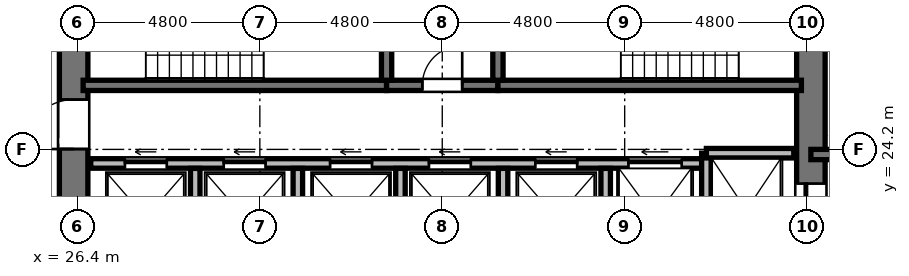
"""IFC4 building model, lengths in metres.
Left out: names, types, materials, properties, quantities, classifications, styles, units other than length and angle.
Written with IfcOpenShell. Run it as: python <this file> out.ifc"""

import sys

from ifc_helpers import new_model, si_unit, direction, frame, frame_2d, origin, place, context, subcontext, project, spatial, rectangle, extrude, element, fill, save


model = new_model("IFC4")
c1 = context("Model", 3, precision=1e-05, world=origin(), true_north=direction((0.0, 1.0)))
c2 = subcontext(c1, "Body", "Model", "MODEL_VIEW")
j1 = project(units=[si_unit("LENGTHUNIT", "METRE"), si_unit("PLANEANGLEUNIT", "RADIAN")], contexts=[c1])
p1 = place(None, origin())
s1 = spatial("IfcSite", under=j1, at=p1, CompositionType="ELEMENT")
p2 = place(p1, origin())
s2 = spatial("IfcBuilding", under=s1, at=p2, CompositionType="ELEMENT")
p3 = place(p2, frame((0.0, 0.0, 103.632)))
s3 = spatial("IfcBuildingStorey", under=s2, at=p3, CompositionType="ELEMENT", Elevation=103.632)
p4 = place(p3, frame((26.3, 20.95, 0.0), z_axis=(0.0, 0.0, 1.0), x_axis=(0.0, 1.0, 0.0)))
e1 = element("IfcWall", 1, at=p4, inside=s3, PredefinedType="SHEAR", context=c2, shape_type="SweptSolid", body=[
    extrude(rectangle(XDim=14.1, YDim=0.75, at=frame_2d((7.05, 0.0))), origin(), (0.0, 0.0, 1.0), 3.648),
])
p5 = place(p4, frame((6.5, 0.0, 0.0)))
e2 = element("IfcOpeningElement", 2, at=p5, cuts=e1, PredefinedType="OPENING", context=c2, shape_type="SweptSolid", body=[
    extrude(rectangle(XDim=1.2, YDim=2.15, at=frame_2d((0.6, 1.075))), frame((0.0, 0.385, 0.0), z_axis=(0.0, -1.0, 0.0), x_axis=(1.0, 0.0, 0.0)), (0.0, 0.0, 1.0), 0.77),
])
p6 = place(p4, frame((9.6, 0.0, 0.0)))
e3 = element("IfcOpeningElement", 3, at=p6, cuts=e1, PredefinedType="OPENING", context=c2, shape_type="SweptSolid", body=[
    extrude(rectangle(XDim=1.3, YDim=2.2, at=frame_2d((0.65, 1.1))), frame((0.0, 0.385, 0.0), z_axis=(0.0, -1.0, 0.0), x_axis=(1.0, 0.0, 0.0)), (0.0, 0.0, 1.0), 0.77),
])
p7 = place(p4, frame((3.26, 0.0, 0.0)))
e4 = element("IfcOpeningElement", 4, at=p7, cuts=e1, PredefinedType="OPENING", context=c2, shape_type="SweptSolid", body=[
    extrude(rectangle(XDim=1.3, YDim=2.2, at=frame_2d((0.65, 1.1))), frame((0.0, 0.385, 0.0), z_axis=(0.0, -1.0, 0.0), x_axis=(1.0, 0.0, 0.0)), (0.0, 0.0, 1.0), 0.77),
])
p8 = place(p3, frame((45.7, 20.95, 0.0), z_axis=(0.0, 0.0, 1.0), x_axis=(0.0, 1.0, 0.0)))
e5 = element("IfcWall", 5, at=p8, inside=s3, PredefinedType="SHEAR", context=c2, shape_type="SweptSolid", body=[
    extrude(rectangle(XDim=14.1, YDim=0.75, at=frame_2d((7.05, 0.0))), origin(), (0.0, 0.0, 1.0), 3.648),
])
p9 = place(p8, frame((11.75, 0.0, 0.0)))
e6 = element("IfcOpeningElement", 6, at=p9, cuts=e5, PredefinedType="OPENING", context=c2, shape_type="SweptSolid", body=[
    extrude(rectangle(XDim=1.4, YDim=2.3, at=frame_2d((0.7, 1.15))), frame((0.0, 0.385, 0.0), z_axis=(0.0, -1.0, 0.0), x_axis=(1.0, 0.0, 0.0)), (0.0, 0.0, 1.0), 0.77),
])
p10 = place(p8, frame((0.95, 0.0, 0.0)))
e7 = element("IfcOpeningElement", 7, at=p10, cuts=e5, PredefinedType="OPENING", context=c2, shape_type="SweptSolid", body=[
    extrude(rectangle(XDim=1.4, YDim=2.3, at=frame_2d((0.7, 1.15))), frame((0.0, 0.385, 0.0), z_axis=(0.0, -1.0, 0.0), x_axis=(1.0, 0.0, 0.0)), (0.0, 0.0, 1.0), 0.77),
])
p11 = place(p3, frame((26.55, 25.885, 0.0), z_axis=(0.0, 0.0, 1.0), x_axis=(1.0, 0.0, 0.0)))
e8 = element("IfcWall", 8, at=p11, inside=s3, PredefinedType="SHEAR", context=c2, shape_type="SweptSolid", body=[
    extrude(rectangle(XDim=7.985, YDim=0.27, at=frame_2d((3.992, 0.0))), origin(), (0.0, 0.0, 1.0), 3.648),
])
p12 = place(p3, frame((34.535, 25.885, 0.0), z_axis=(0.0, 0.0, 1.0), x_axis=(1.0, 0.0, 0.0)))
e9 = element("IfcWall", 9, at=p12, inside=s3, PredefinedType="SHEAR", context=c2, shape_type="SweptSolid", body=[
    extrude(rectangle(XDim=2.93, YDim=0.27, at=frame_2d((1.465, 0.0))), origin(), (0.0, 0.0, 1.0), 3.648),
])
p13 = place(p12, frame((0.94, 0.0, 0.0)))
e10 = element("IfcOpeningElement", 10, at=p13, cuts=e9, PredefinedType="OPENING", context=c2, shape_type="SweptSolid", body=[
    extrude(rectangle(XDim=1.05, YDim=2.15, at=frame_2d((0.525, 1.075))), frame((0.0, 0.145, 0.0), z_axis=(0.0, -1.0, 0.0), x_axis=(1.0, 0.0, 0.0)), (0.0, 0.0, 1.0), 0.29),
])
p14 = place(p3, frame((37.465, 25.885, 0.0), z_axis=(0.0, 0.0, 1.0), x_axis=(1.0, 0.0, 0.0)))
e11 = element("IfcWall", 11, at=p14, inside=s3, PredefinedType="SHEAR", context=c2, shape_type="SweptSolid", body=[
    extrude(rectangle(XDim=7.985, YDim=0.27, at=frame_2d((3.992, 0.0))), origin(), (0.0, 0.0, 1.0), 3.648),
])
for number, where, z_axis, x_axis in (
    (12, (34.535, 26.02, 0.0), (0.0, 0.0, 1.0), (0.0, 1.0, 0.0)),
    (13, (37.465, 26.02, 0.0), (0.0, 0.0, 1.0), (0.0, 1.0, 0.0)),
):
    element("IfcWall", number, at=place(p3, frame(where, z_axis=z_axis, x_axis=x_axis)), inside=s3, PredefinedType="SHEAR", context=c2, shape_type="SweptSolid", body=[
        extrude(rectangle(XDim=4.08, YDim=0.27, at=frame_2d((2.04, 0.0))), origin(), (0.0, 0.0, 1.0), 3.648),
    ])
p15 = place(p3, frame((26.75, 23.83, 0.0), z_axis=(0.0, 0.0, 1.0), x_axis=(1.0, 0.0, 0.0)))
e14 = element("IfcWall", 14, at=p15, inside=s3, PredefinedType="SOLIDWALL", context=c2, shape_type="SweptSolid", body=[
    extrude(rectangle(XDim=16.2, YDim=0.25, at=frame_2d((8.1, 0.0))), origin(), (0.0, 0.0, 1.0), 3.428),
])
p16 = place(p15, frame((0.9, 0.0, 0.0)))
e15 = element("IfcOpeningElement", 15, at=p16, cuts=e14, PredefinedType="OPENING", context=c2, shape_type="SweptSolid", body=[
    extrude(rectangle(XDim=1.1, YDim=2.2, at=frame_2d((0.55, 1.1))), frame((0.0, 0.135, 0.0), z_axis=(0.0, -1.0, 0.0), x_axis=(1.0, 0.0, 0.0)), (0.0, 0.0, 1.0), 0.27),
])
p17 = place(p15, frame((3.5, 0.0, 0.0)))
e16 = element("IfcOpeningElement", 16, at=p17, cuts=e14, PredefinedType="OPENING", context=c2, shape_type="SweptSolid", body=[
    extrude(rectangle(XDim=1.1, YDim=2.2, at=frame_2d((0.55, 1.1))), frame((0.0, 0.135, 0.0), z_axis=(0.0, -1.0, 0.0), x_axis=(1.0, 0.0, 0.0)), (0.0, 0.0, 1.0), 0.27),
])
p18 = place(p15, frame((6.3, 0.0, 0.0)))
e17 = element("IfcOpeningElement", 17, at=p18, cuts=e14, PredefinedType="OPENING", context=c2, shape_type="SweptSolid", body=[
    extrude(rectangle(XDim=1.1, YDim=2.2, at=frame_2d((0.55, 1.1))), frame((0.0, 0.135, 0.0), z_axis=(0.0, -1.0, 0.0), x_axis=(1.0, 0.0, 0.0)), (0.0, 0.0, 1.0), 0.27),
])
p19 = place(p15, frame((8.9, 0.0, 0.0)))
e18 = element("IfcOpeningElement", 18, at=p19, cuts=e14, PredefinedType="OPENING", context=c2, shape_type="SweptSolid", body=[
    extrude(rectangle(XDim=1.1, YDim=2.2, at=frame_2d((0.55, 1.1))), frame((0.0, 0.135, 0.0), z_axis=(0.0, -1.0, 0.0), x_axis=(1.0, 0.0, 0.0)), (0.0, 0.0, 1.0), 0.27),
])
p20 = place(p15, frame((11.7, 0.0, 0.0)))
e19 = element("IfcOpeningElement", 19, at=p20, cuts=e14, PredefinedType="OPENING", context=c2, shape_type="SweptSolid", body=[
    extrude(rectangle(XDim=1.1, YDim=2.2, at=frame_2d((0.55, 1.1))), frame((0.0, 0.135, 0.0), z_axis=(0.0, -1.0, 0.0), x_axis=(1.0, 0.0, 0.0)), (0.0, 0.0, 1.0), 0.27),
])
p21 = place(p15, frame((14.15, 0.0, 0.0)))
e20 = element("IfcOpeningElement", 20, at=p21, cuts=e14, PredefinedType="OPENING", context=c2, shape_type="SweptSolid", body=[
    extrude(rectangle(XDim=1.4, YDim=2.3, at=frame_2d((0.7, 1.15))), frame((0.0, 0.135, 0.0), z_axis=(0.0, -1.0, 0.0), x_axis=(1.0, 0.0, 0.0)), (0.0, 0.0, 1.0), 0.27),
])
p22 = place(p3, frame((42.95, 20.9, 0.0), z_axis=(0.0, 0.0, 1.0), x_axis=(0.0, 1.0, 0.0)))
e21 = element("IfcWall", 21, at=p22, inside=s3, PredefinedType="SOLIDWALL", context=c2, shape_type="SweptSolid", body=[
    extrude(rectangle(XDim=3.2, YDim=0.25, at=frame_2d((1.6, 0.0))), origin(), (0.0, 0.0, 1.0), 3.428),
])
p23 = place(p3, frame((42.95, 24.1, 0.0), z_axis=(0.0, 0.0, 1.0), x_axis=(1.0, 0.0, 0.0)))
e22 = element("IfcWall", 22, at=p23, inside=s3, PredefinedType="SOLIDWALL", context=c2, shape_type="SweptSolid", body=[
    extrude(rectangle(XDim=2.3, YDim=0.25, at=frame_2d((1.15, 0.0))), origin(), (0.0, 0.0, 1.0), 3.428),
])
for number, where, z_axis, x_axis in (
    (23, (29.5, 20.9, 0.0), (0.0, 0.0, 1.0), (0.0, 1.0, 0.0)),
    (24, (32.2, 20.9, 0.0), (0.0, 0.0, 1.0), (0.0, 1.0, 0.0)),
    (25, (34.9, 20.9, 0.0), (0.0, 0.0, 1.0), (0.0, 1.0, 0.0)),
    (26, (37.6, 20.9, 0.0), (0.0, 0.0, 1.0), (0.0, 1.0, 0.0)),
    (27, (40.3, 20.9, 0.0), (0.0, 0.0, 1.0), (0.0, 1.0, 0.0)),
):
    element("IfcWall", number, at=place(p3, frame(where, z_axis=z_axis, x_axis=x_axis)), inside=s3, PredefinedType="SOLIDWALL", context=c2, shape_type="SweptSolid", body=[
        extrude(rectangle(XDim=2.8, YDim=0.25, at=frame_2d((1.4, 0.0))), origin(), (0.0, 0.0, 1.0), 3.428),
    ])
p24 = place(p3, frame((45.7, 24.065, 0.0), z_axis=(0.0, 0.0, 1.0), x_axis=(1.0, 0.0, 0.0)))
e28 = element("IfcWall", 28, at=p24, inside=s3, PredefinedType="SHEAR", context=c2, shape_type="SweptSolid", body=[
    extrude(rectangle(XDim=4.715, YDim=0.27, at=frame_2d((2.357, 0.0))), origin(), (0.0, 0.0, 1.0), 3.648),
])
p25 = place(p13, origin())
e29 = element("IfcDoor", 29, at=p25, inside=s3, OperationType="SINGLE_SWING_RIGHT", PredefinedType="DOOR", context=c2, shape_type="SweptSolid", body=[
    extrude(rectangle(XDim=1.05, YDim=2.15, at=frame_2d((0.525, 1.075))), frame((0.0, 0.025, 0.0), z_axis=(0.0, -1.0, 0.0), x_axis=(1.0, 0.0, 0.0)), (0.0, 0.0, 1.0), 0.05),
])
fill(e10, e29)
p26 = place(p7, origin())
e30 = element("IfcDoor", 30, at=p26, inside=s3, OperationType="SINGLE_SWING_LEFT", PredefinedType="DOOR", context=c2, shape_type="SweptSolid", body=[
    extrude(rectangle(XDim=1.3, YDim=2.2, at=frame_2d((0.65, 1.1))), frame((0.0, 0.025, 0.0), z_axis=(0.0, -1.0, 0.0), x_axis=(1.0, 0.0, 0.0)), (0.0, 0.0, 1.0), 0.05),
])
fill(e4, e30)
p27 = place(p16, origin())
e31 = element("IfcDoor", 31, at=p27, inside=s3, OperationType="SLIDING_TO_LEFT", PredefinedType="DOOR", context=c2, shape_type="SweptSolid", body=[
    extrude(rectangle(XDim=1.1, YDim=2.2, at=frame_2d((0.55, 1.1))), frame((0.0, 0.025, 0.0), z_axis=(0.0, -1.0, 0.0), x_axis=(1.0, 0.0, 0.0)), (0.0, 0.0, 1.0), 0.05),
])
fill(e15, e31)
p28 = place(p17, origin())
e32 = element("IfcDoor", 32, at=p28, inside=s3, OperationType="SLIDING_TO_LEFT", PredefinedType="DOOR", context=c2, shape_type="SweptSolid", body=[
    extrude(rectangle(XDim=1.1, YDim=2.2, at=frame_2d((0.55, 1.1))), frame((0.0, 0.025, 0.0), z_axis=(0.0, -1.0, 0.0), x_axis=(1.0, 0.0, 0.0)), (0.0, 0.0, 1.0), 0.05),
])
fill(e16, e32)
p29 = place(p18, origin())
e33 = element("IfcDoor", 33, at=p29, inside=s3, OperationType="SLIDING_TO_LEFT", PredefinedType="DOOR", context=c2, shape_type="SweptSolid", body=[
    extrude(rectangle(XDim=1.1, YDim=2.2, at=frame_2d((0.55, 1.1))), frame((0.0, 0.025, 0.0), z_axis=(0.0, -1.0, 0.0), x_axis=(1.0, 0.0, 0.0)), (0.0, 0.0, 1.0), 0.05),
])
fill(e17, e33)
p30 = place(p19, origin())
e34 = element("IfcDoor", 34, at=p30, inside=s3, OperationType="SLIDING_TO_LEFT", PredefinedType="DOOR", context=c2, shape_type="SweptSolid", body=[
    extrude(rectangle(XDim=1.1, YDim=2.2, at=frame_2d((0.55, 1.1))), frame((0.0, 0.025, 0.0), z_axis=(0.0, -1.0, 0.0), x_axis=(1.0, 0.0, 0.0)), (0.0, 0.0, 1.0), 0.05),
])
fill(e18, e34)
p31 = place(p20, origin())
e35 = element("IfcDoor", 35, at=p31, inside=s3, OperationType="SLIDING_TO_LEFT", PredefinedType="DOOR", context=c2, shape_type="SweptSolid", body=[
    extrude(rectangle(XDim=1.1, YDim=2.2, at=frame_2d((0.55, 1.1))), frame((0.0, 0.025, 0.0), z_axis=(0.0, -1.0, 0.0), x_axis=(1.0, 0.0, 0.0)), (0.0, 0.0, 1.0), 0.05),
])
fill(e19, e35)
p32 = place(p10, origin())
e36 = element("IfcDoor", 36, at=p32, inside=s3, OperationType="SLIDING_TO_LEFT", PredefinedType="DOOR", context=c2, shape_type="SweptSolid", body=[
    extrude(rectangle(XDim=1.4, YDim=2.3, at=frame_2d((0.7, 1.15))), frame((0.0, 0.025, 0.0), z_axis=(0.0, -1.0, 0.0), x_axis=(1.0, 0.0, 0.0)), (0.0, 0.0, 1.0), 0.05),
])
fill(e7, e36)
p33 = place(p21, origin())
e37 = element("IfcDoor", 37, at=p33, inside=s3, OperationType="SLIDING_TO_LEFT", PredefinedType="DOOR", context=c2, shape_type="SweptSolid", body=[
    extrude(rectangle(XDim=1.4, YDim=2.3, at=frame_2d((0.7, 1.15))), frame((0.0, 0.025, 0.0), z_axis=(0.0, -1.0, 0.0), x_axis=(1.0, 0.0, 0.0)), (0.0, 0.0, 1.0), 0.05),
])
fill(e20, e37)
save(model, sys.argv[1])
